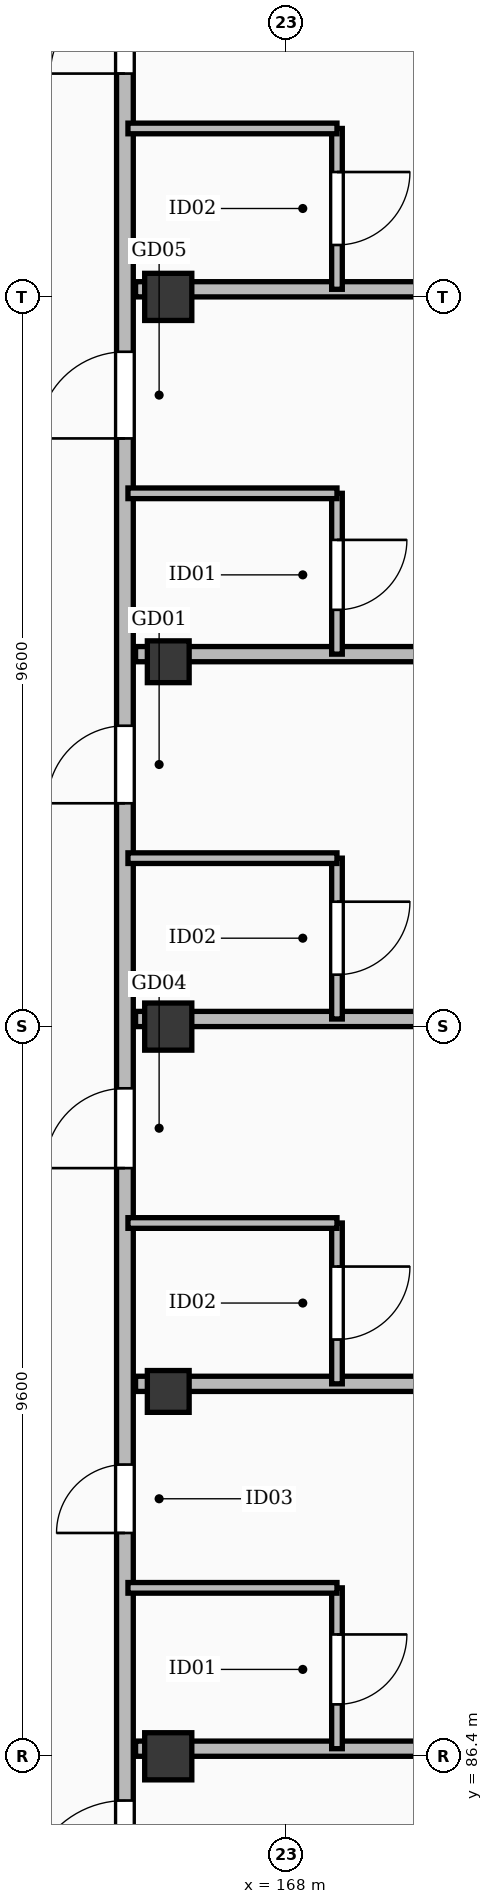
"""IFC4 building model, lengths in metres.
Left out: names, types, materials, properties, quantities, classifications, styles, units other than length and angle.
Written with IfcOpenShell. Run it as: python <this file> out.ifc"""

import sys

from ifc_helpers import new_model, si_unit, direction, frame, frame_2d, origin, origin_2d, place, context, subcontext, project, spatial, rectangle, extrude, element, fill, save


model = new_model("IFC4")
c1 = context("Model", 3, precision=1e-05, world=origin(), true_north=direction((0.0, 1.0)))
c2 = subcontext(c1, "Body", "Model", "MODEL_VIEW")
j1 = project(units=[si_unit("LENGTHUNIT", "METRE"), si_unit("PLANEANGLEUNIT", "RADIAN")], contexts=[c1])
p1 = place(None, origin())
s1 = spatial("IfcSite", under=j1, at=p1, CompositionType="ELEMENT")
p2 = place(p1, origin())
s2 = spatial("IfcBuilding", under=s1, at=p2, CompositionType="ELEMENT")
p3 = place(p2, frame((0.0, 0.0, 42.6)))
s3 = spatial("IfcBuildingStorey", under=s2, at=p3, CompositionType="ELEMENT", Elevation=42.6)
for number, where, z_axis, x_axis in (
    (1, (166.45, 86.4, 0.0), (0.0, 0.0, 1.0), (1.0, 0.0, 0.0)),
    (2, (166.45, 96.0, 0.0), (0.0, 0.0, 1.0), (1.0, 0.0, 0.0)),
    (3, (166.45, 105.6, 0.0), (0.0, 0.0, 1.0), (1.0, 0.0, 0.0)),
):
    element("IfcColumn", number, at=place(p3, frame(where, z_axis=z_axis, x_axis=x_axis)), inside=s3, PredefinedType="COLUMN", context=c2, shape_type="SweptSolid", body=[
        extrude(rectangle(XDim=0.62, YDim=0.62, at=origin_2d()), origin(), (0.0, 0.0, 1.0), 3.9),
    ])
for number, where, z_axis, x_axis in (
    (4, (166.45, 91.2, 0.0), (0.0, 0.0, 1.0), (1.0, 0.0, 0.0)),
    (5, (166.45, 100.8, 0.0), (0.0, 0.0, 1.0), (1.0, 0.0, 0.0)),
):
    element("IfcColumn", number, at=place(p3, frame(where, z_axis=z_axis, x_axis=x_axis)), inside=s3, PredefinedType="COLUMN", context=c2, shape_type="SweptSolid", body=[
        extrude(rectangle(XDim=0.55, YDim=0.55, at=origin_2d()), origin(), (0.0, 0.0, 1.0), 3.9),
    ])
p4 = place(p3, frame((165.88, 62.75, 0.0), z_axis=(0.0, 0.0, 1.0), x_axis=(0.0, 1.0, 0.0)))
e6 = element("IfcWall", 6, at=p4, inside=s3, PredefinedType="PARTITIONING", context=c2, shape_type="SweptSolid", body=[
    extrude(rectangle(XDim=62.9, YDim=0.22, at=frame_2d((31.45, 0.0))), origin(), (0.0, 0.0, 1.0), 2.902),
])
p5 = place(p4, frame((0.691, 0.0, 0.0)))
e7 = element("IfcOpeningElement", 7, at=p5, cuts=e6, PredefinedType="OPENING", context=c2, shape_type="SweptSolid", body=[
    extrude(rectangle(XDim=1.05, YDim=2.22, at=frame_2d((0.525, 1.11))), frame((0.0, 0.122, 0.0), z_axis=(0.0, -1.0, 0.0), x_axis=(1.0, 0.0, 0.0)), (0.0, 0.0, 1.0), 0.244),
])
p6 = place(p4, frame((7.388, 0.0, 0.0)))
e8 = element("IfcOpeningElement", 8, at=p6, cuts=e6, PredefinedType="OPENING", context=c2, shape_type="SweptSolid", body=[
    extrude(rectangle(XDim=1.02, YDim=2.2, at=frame_2d((0.51, 1.1))), frame((0.0, 0.122, 0.0), z_axis=(0.0, -1.0, 0.0), x_axis=(1.0, 0.0, 0.0)), (0.0, 0.0, 1.0), 0.244),
])
p7 = place(p4, frame((12.188, 0.0, 0.0)))
e9 = element("IfcOpeningElement", 9, at=p7, cuts=e6, PredefinedType="OPENING", context=c2, shape_type="SweptSolid", body=[
    extrude(rectangle(XDim=1.14, YDim=2.26, at=frame_2d((0.57, 1.13))), frame((0.0, 0.122, 0.0), z_axis=(0.0, -1.0, 0.0), x_axis=(1.0, 0.0, 0.0)), (0.0, 0.0, 1.0), 0.244),
])
p8 = place(p4, frame((16.988, 0.0, 0.0)))
e10 = element("IfcOpeningElement", 10, at=p8, cuts=e6, PredefinedType="OPENING", context=c2, shape_type="SweptSolid", body=[
    extrude(rectangle(XDim=0.98, YDim=2.15, at=frame_2d((0.49, 1.075))), frame((0.0, 0.122, 0.0), z_axis=(0.0, -1.0, 0.0), x_axis=(1.0, 0.0, 0.0)), (0.0, 0.0, 1.0), 0.244),
])
p9 = place(p4, frame((21.788, 0.0, 0.0)))
e11 = element("IfcOpeningElement", 11, at=p9, cuts=e6, PredefinedType="OPENING", context=c2, shape_type="SweptSolid", body=[
    extrude(rectangle(XDim=1.28, YDim=2.16, at=frame_2d((0.64, 1.08))), frame((0.0, 0.122, 0.0), z_axis=(0.0, -1.0, 0.0), x_axis=(1.0, 0.0, 0.0)), (0.0, 0.0, 1.0), 0.244),
])
p10 = place(p4, frame((26.588, 0.0, 0.0)))
e12 = element("IfcOpeningElement", 12, at=p10, cuts=e6, PredefinedType="OPENING", context=c2, shape_type="SweptSolid", body=[
    extrude(rectangle(XDim=0.9, YDim=2.08, at=frame_2d((0.45, 1.04))), frame((0.0, 0.122, 0.0), z_axis=(0.0, -1.0, 0.0), x_axis=(1.0, 0.0, 0.0)), (0.0, 0.0, 1.0), 0.244),
])
p11 = place(p4, frame((31.388, 0.0, 0.0)))
e13 = element("IfcOpeningElement", 13, at=p11, cuts=e6, PredefinedType="OPENING", context=c2, shape_type="SweptSolid", body=[
    extrude(rectangle(XDim=1.05, YDim=2.22, at=frame_2d((0.525, 1.11))), frame((0.0, 0.122, 0.0), z_axis=(0.0, -1.0, 0.0), x_axis=(1.0, 0.0, 0.0)), (0.0, 0.0, 1.0), 0.244),
])
p12 = place(p4, frame((36.188, 0.0, 0.0)))
e14 = element("IfcOpeningElement", 14, at=p12, cuts=e6, PredefinedType="OPENING", context=c2, shape_type="SweptSolid", body=[
    extrude(rectangle(XDim=1.02, YDim=2.2, at=frame_2d((0.51, 1.1))), frame((0.0, 0.122, 0.0), z_axis=(0.0, -1.0, 0.0), x_axis=(1.0, 0.0, 0.0)), (0.0, 0.0, 1.0), 0.244),
])
p13 = place(p4, frame((40.988, 0.0, 0.0)))
e15 = element("IfcOpeningElement", 15, at=p13, cuts=e6, PredefinedType="OPENING", context=c2, shape_type="SweptSolid", body=[
    extrude(rectangle(XDim=1.14, YDim=2.26, at=frame_2d((0.57, 1.13))), frame((0.0, 0.122, 0.0), z_axis=(0.0, -1.0, 0.0), x_axis=(1.0, 0.0, 0.0)), (0.0, 0.0, 1.0), 0.244),
])
p14 = place(p4, frame((45.788, 0.0, 0.0)))
e16 = element("IfcOpeningElement", 16, at=p14, cuts=e6, PredefinedType="OPENING", context=c2, shape_type="SweptSolid", body=[
    extrude(rectangle(XDim=0.98, YDim=2.15, at=frame_2d((0.49, 1.075))), frame((0.0, 0.122, 0.0), z_axis=(0.0, -1.0, 0.0), x_axis=(1.0, 0.0, 0.0)), (0.0, 0.0, 1.0), 0.244),
])
p15 = place(p4, frame((50.588, 0.0, 0.0)))
e17 = element("IfcOpeningElement", 17, at=p15, cuts=e6, PredefinedType="OPENING", context=c2, shape_type="SweptSolid", body=[
    extrude(rectangle(XDim=1.28, YDim=2.16, at=frame_2d((0.64, 1.08))), frame((0.0, 0.122, 0.0), z_axis=(0.0, -1.0, 0.0), x_axis=(1.0, 0.0, 0.0)), (0.0, 0.0, 1.0), 0.244),
])
p16 = place(p4, frame((55.388, 0.0, 0.0)))
e18 = element("IfcOpeningElement", 18, at=p16, cuts=e6, PredefinedType="OPENING", context=c2, shape_type="SweptSolid", body=[
    extrude(rectangle(XDim=0.9, YDim=2.08, at=frame_2d((0.45, 1.04))), frame((0.0, 0.122, 0.0), z_axis=(0.0, -1.0, 0.0), x_axis=(1.0, 0.0, 0.0)), (0.0, 0.0, 1.0), 0.244),
])
p17 = place(p4, frame((60.188, 0.0, 0.0)))
e19 = element("IfcOpeningElement", 19, at=p17, cuts=e6, PredefinedType="OPENING", context=c2, shape_type="SweptSolid", body=[
    extrude(rectangle(XDim=1.05, YDim=2.22, at=frame_2d((0.525, 1.11))), frame((0.0, 0.122, 0.0), z_axis=(0.0, -1.0, 0.0), x_axis=(1.0, 0.0, 0.0)), (0.0, 0.0, 1.0), 0.244),
])
p18 = place(p3, frame((166.02, 86.5, 0.0), z_axis=(0.0, 0.0, 1.0), x_axis=(1.0, 0.0, 0.0)))
e20 = element("IfcWall", 20, at=p18, inside=s3, PredefinedType="PARTITIONING", context=c2, shape_type="SweptSolid", body=[
    extrude(rectangle(XDim=13.23, YDim=0.2, at=frame_2d((6.615, 0.0))), origin(), (0.0, 0.0, 1.0), 2.902),
])
p19 = place(p3, frame((168.67, 86.5, 0.0), z_axis=(0.0, 0.0, 1.0), x_axis=(0.0, 1.0, 0.0)))
e21 = element("IfcWall", 21, at=p19, inside=s3, PredefinedType="PARTITIONING", context=c2, shape_type="SweptSolid", body=[
    extrude(rectangle(XDim=2.116, YDim=0.14, at=frame_2d((1.058, 0.0))), origin(), (0.0, 0.0, 1.0), 3.072),
])
p20 = place(p19, frame((0.583, 0.0, 0.0)))
e22 = element("IfcOpeningElement", 22, at=p20, cuts=e21, PredefinedType="OPENING", context=c2, shape_type="SweptSolid", body=[
    extrude(rectangle(XDim=0.92, YDim=2.1, at=frame_2d((0.46, 1.05))), frame((0.0, 0.082, 0.0), z_axis=(0.0, -1.0, 0.0), x_axis=(1.0, 0.0, 0.0)), (0.0, 0.0, 1.0), 0.164),
])
p21 = place(p3, frame((165.92, 88.616, 0.0), z_axis=(0.0, 0.0, 1.0), x_axis=(1.0, 0.0, 0.0)))
e23 = element("IfcWall", 23, at=p21, inside=s3, PredefinedType="PARTITIONING", context=c2, shape_type="SweptSolid", body=[
    extrude(rectangle(XDim=2.75, YDim=0.14, at=frame_2d((1.375, 0.0))), origin(), (0.0, 0.0, 1.0), 3.072),
])
p22 = place(p3, frame((166.02, 91.3, 0.0), z_axis=(0.0, 0.0, 1.0), x_axis=(1.0, 0.0, 0.0)))
e24 = element("IfcWall", 24, at=p22, inside=s3, PredefinedType="PARTITIONING", context=c2, shape_type="SweptSolid", body=[
    extrude(rectangle(XDim=13.23, YDim=0.2, at=frame_2d((6.615, 0.0))), origin(), (0.0, 0.0, 1.0), 2.902),
])
p23 = place(p3, frame((168.67, 91.3, 0.0), z_axis=(0.0, 0.0, 1.0), x_axis=(0.0, 1.0, 0.0)))
e25 = element("IfcWall", 25, at=p23, inside=s3, PredefinedType="PARTITIONING", context=c2, shape_type="SweptSolid", body=[
    extrude(rectangle(XDim=2.116, YDim=0.14, at=frame_2d((1.058, 0.0))), origin(), (0.0, 0.0, 1.0), 3.072),
])
p24 = place(p23, frame((0.583, 0.0, 0.0)))
e26 = element("IfcOpeningElement", 26, at=p24, cuts=e25, PredefinedType="OPENING", context=c2, shape_type="SweptSolid", body=[
    extrude(rectangle(XDim=0.96, YDim=2.12, at=frame_2d((0.48, 1.06))), frame((0.0, 0.082, 0.0), z_axis=(0.0, -1.0, 0.0), x_axis=(1.0, 0.0, 0.0)), (0.0, 0.0, 1.0), 0.164),
])
p25 = place(p3, frame((165.92, 93.416, 0.0), z_axis=(0.0, 0.0, 1.0), x_axis=(1.0, 0.0, 0.0)))
e27 = element("IfcWall", 27, at=p25, inside=s3, PredefinedType="PARTITIONING", context=c2, shape_type="SweptSolid", body=[
    extrude(rectangle(XDim=2.75, YDim=0.14, at=frame_2d((1.375, 0.0))), origin(), (0.0, 0.0, 1.0), 3.072),
])
p26 = place(p3, frame((166.02, 96.1, 0.0), z_axis=(0.0, 0.0, 1.0), x_axis=(1.0, 0.0, 0.0)))
e28 = element("IfcWall", 28, at=p26, inside=s3, PredefinedType="PARTITIONING", context=c2, shape_type="SweptSolid", body=[
    extrude(rectangle(XDim=13.23, YDim=0.2, at=frame_2d((6.615, 0.0))), origin(), (0.0, 0.0, 1.0), 2.902),
])
p27 = place(p3, frame((168.67, 96.1, 0.0), z_axis=(0.0, 0.0, 1.0), x_axis=(0.0, 1.0, 0.0)))
e29 = element("IfcWall", 29, at=p27, inside=s3, PredefinedType="PARTITIONING", context=c2, shape_type="SweptSolid", body=[
    extrude(rectangle(XDim=2.116, YDim=0.14, at=frame_2d((1.058, 0.0))), origin(), (0.0, 0.0, 1.0), 3.072),
])
p28 = place(p27, frame((0.583, 0.0, 0.0)))
e30 = element("IfcOpeningElement", 30, at=p28, cuts=e29, PredefinedType="OPENING", context=c2, shape_type="SweptSolid", body=[
    extrude(rectangle(XDim=0.96, YDim=2.12, at=frame_2d((0.48, 1.06))), frame((0.0, 0.082, 0.0), z_axis=(0.0, -1.0, 0.0), x_axis=(1.0, 0.0, 0.0)), (0.0, 0.0, 1.0), 0.164),
])
p29 = place(p3, frame((165.92, 98.216, 0.0), z_axis=(0.0, 0.0, 1.0), x_axis=(1.0, 0.0, 0.0)))
e31 = element("IfcWall", 31, at=p29, inside=s3, PredefinedType="PARTITIONING", context=c2, shape_type="SweptSolid", body=[
    extrude(rectangle(XDim=2.75, YDim=0.14, at=frame_2d((1.375, 0.0))), origin(), (0.0, 0.0, 1.0), 3.072),
])
p30 = place(p3, frame((166.02, 100.9, 0.0), z_axis=(0.0, 0.0, 1.0), x_axis=(1.0, 0.0, 0.0)))
e32 = element("IfcWall", 32, at=p30, inside=s3, PredefinedType="PARTITIONING", context=c2, shape_type="SweptSolid", body=[
    extrude(rectangle(XDim=13.23, YDim=0.2, at=frame_2d((6.615, 0.0))), origin(), (0.0, 0.0, 1.0), 2.902),
])
p31 = place(p3, frame((168.67, 100.9, 0.0), z_axis=(0.0, 0.0, 1.0), x_axis=(0.0, 1.0, 0.0)))
e33 = element("IfcWall", 33, at=p31, inside=s3, PredefinedType="PARTITIONING", context=c2, shape_type="SweptSolid", body=[
    extrude(rectangle(XDim=2.116, YDim=0.14, at=frame_2d((1.058, 0.0))), origin(), (0.0, 0.0, 1.0), 3.072),
])
p32 = place(p31, frame((0.583, 0.0, 0.0)))
e34 = element("IfcOpeningElement", 34, at=p32, cuts=e33, PredefinedType="OPENING", context=c2, shape_type="SweptSolid", body=[
    extrude(rectangle(XDim=0.92, YDim=2.1, at=frame_2d((0.46, 1.05))), frame((0.0, 0.082, 0.0), z_axis=(0.0, -1.0, 0.0), x_axis=(1.0, 0.0, 0.0)), (0.0, 0.0, 1.0), 0.164),
])
p33 = place(p3, frame((165.92, 103.016, 0.0), z_axis=(0.0, 0.0, 1.0), x_axis=(1.0, 0.0, 0.0)))
e35 = element("IfcWall", 35, at=p33, inside=s3, PredefinedType="PARTITIONING", context=c2, shape_type="SweptSolid", body=[
    extrude(rectangle(XDim=2.75, YDim=0.14, at=frame_2d((1.375, 0.0))), origin(), (0.0, 0.0, 1.0), 3.072),
])
p34 = place(p3, frame((166.02, 105.7, 0.0), z_axis=(0.0, 0.0, 1.0), x_axis=(1.0, 0.0, 0.0)))
e36 = element("IfcWall", 36, at=p34, inside=s3, PredefinedType="PARTITIONING", context=c2, shape_type="SweptSolid", body=[
    extrude(rectangle(XDim=13.23, YDim=0.2, at=frame_2d((6.615, 0.0))), origin(), (0.0, 0.0, 1.0), 2.902),
])
p35 = place(p3, frame((168.67, 105.7, 0.0), z_axis=(0.0, 0.0, 1.0), x_axis=(0.0, 1.0, 0.0)))
e37 = element("IfcWall", 37, at=p35, inside=s3, PredefinedType="PARTITIONING", context=c2, shape_type="SweptSolid", body=[
    extrude(rectangle(XDim=2.116, YDim=0.14, at=frame_2d((1.058, 0.0))), origin(), (0.0, 0.0, 1.0), 3.072),
])
p36 = place(p35, frame((0.583, 0.0, 0.0)))
e38 = element("IfcOpeningElement", 38, at=p36, cuts=e37, PredefinedType="OPENING", context=c2, shape_type="SweptSolid", body=[
    extrude(rectangle(XDim=0.96, YDim=2.12, at=frame_2d((0.48, 1.06))), frame((0.0, 0.082, 0.0), z_axis=(0.0, -1.0, 0.0), x_axis=(1.0, 0.0, 0.0)), (0.0, 0.0, 1.0), 0.164),
])
p37 = place(p3, frame((165.92, 107.816, 0.0), z_axis=(0.0, 0.0, 1.0), x_axis=(1.0, 0.0, 0.0)))
e39 = element("IfcWall", 39, at=p37, inside=s3, PredefinedType="PARTITIONING", context=c2, shape_type="SweptSolid", body=[
    extrude(rectangle(XDim=2.75, YDim=0.14, at=frame_2d((1.375, 0.0))), origin(), (0.0, 0.0, 1.0), 3.072),
])
p38 = place(p9, origin())
e40 = element("IfcDoor", 40, at=p38, inside=s3, OperationType="SINGLE_SWING_LEFT", PredefinedType="DOOR", context=c2, shape_type="SweptSolid", body=[
    extrude(rectangle(XDim=1.28, YDim=2.16, at=frame_2d((0.64, 1.08))), frame((0.0, 0.025, 0.0), z_axis=(0.0, -1.0, 0.0), x_axis=(1.0, 0.0, 0.0)), (0.0, 0.0, 1.0), 0.05),
])
fill(e11, e40)
p39 = place(p10, origin())
e41 = element("IfcDoor", 41, at=p39, inside=s3, OperationType="SINGLE_SWING_LEFT", PredefinedType="DOOR", context=c2, shape_type="SweptSolid", body=[
    extrude(rectangle(XDim=0.9, YDim=2.08, at=frame_2d((0.45, 1.04))), frame((0.0, 0.025, 0.0), z_axis=(0.0, -1.0, 0.0), x_axis=(1.0, 0.0, 0.0)), (0.0, 0.0, 1.0), 0.05),
])
fill(e12, e41)
p40 = place(p20, frame((0.92, 0.0, 0.0), z_axis=(0.0, 0.0, 1.0), x_axis=(-1.0, 0.0, 0.0)))
e42 = element("IfcDoor", 42, at=p40, inside=s3, OperationType="SINGLE_SWING_RIGHT", PredefinedType="DOOR", context=c2, shape_type="SweptSolid", body=[
    extrude(rectangle(XDim=0.92, YDim=2.1, at=frame_2d((0.46, 1.05))), frame((0.0, 0.025, 0.0), z_axis=(0.0, -1.0, 0.0), x_axis=(1.0, 0.0, 0.0)), (0.0, 0.0, 1.0), 0.05),
])
fill(e22, e42)
p41 = place(p11, origin())
e43 = element("IfcDoor", 43, at=p41, inside=s3, OperationType="SINGLE_SWING_LEFT", PredefinedType="DOOR", context=c2, shape_type="SweptSolid", body=[
    extrude(rectangle(XDim=1.05, YDim=2.22, at=frame_2d((0.525, 1.11))), frame((0.0, 0.025, 0.0), z_axis=(0.0, -1.0, 0.0), x_axis=(1.0, 0.0, 0.0)), (0.0, 0.0, 1.0), 0.05),
])
fill(e13, e43)
p42 = place(p24, frame((0.96, 0.0, 0.0), z_axis=(0.0, 0.0, 1.0), x_axis=(-1.0, 0.0, 0.0)))
e44 = element("IfcDoor", 44, at=p42, inside=s3, OperationType="SINGLE_SWING_RIGHT", PredefinedType="DOOR", context=c2, shape_type="SweptSolid", body=[
    extrude(rectangle(XDim=0.96, YDim=2.12, at=frame_2d((0.48, 1.06))), frame((0.0, 0.025, 0.0), z_axis=(0.0, -1.0, 0.0), x_axis=(1.0, 0.0, 0.0)), (0.0, 0.0, 1.0), 0.05),
])
fill(e26, e44)
p43 = place(p12, origin())
e45 = element("IfcDoor", 45, at=p43, inside=s3, OperationType="SINGLE_SWING_LEFT", PredefinedType="DOOR", context=c2, shape_type="SweptSolid", body=[
    extrude(rectangle(XDim=1.02, YDim=2.2, at=frame_2d((0.51, 1.1))), frame((0.0, 0.025, 0.0), z_axis=(0.0, -1.0, 0.0), x_axis=(1.0, 0.0, 0.0)), (0.0, 0.0, 1.0), 0.05),
])
fill(e14, e45)
p44 = place(p28, frame((0.96, 0.0, 0.0), z_axis=(0.0, 0.0, 1.0), x_axis=(-1.0, 0.0, 0.0)))
e46 = element("IfcDoor", 46, at=p44, inside=s3, OperationType="SINGLE_SWING_RIGHT", PredefinedType="DOOR", context=c2, shape_type="SweptSolid", body=[
    extrude(rectangle(XDim=0.96, YDim=2.12, at=frame_2d((0.48, 1.06))), frame((0.0, 0.025, 0.0), z_axis=(0.0, -1.0, 0.0), x_axis=(1.0, 0.0, 0.0)), (0.0, 0.0, 1.0), 0.05),
])
fill(e30, e46)
p45 = place(p13, origin())
e47 = element("IfcDoor", 47, at=p45, inside=s3, OperationType="SINGLE_SWING_LEFT", PredefinedType="DOOR", context=c2, shape_type="SweptSolid", body=[
    extrude(rectangle(XDim=1.14, YDim=2.26, at=frame_2d((0.57, 1.13))), frame((0.0, 0.025, 0.0), z_axis=(0.0, -1.0, 0.0), x_axis=(1.0, 0.0, 0.0)), (0.0, 0.0, 1.0), 0.05),
])
fill(e15, e47)
p46 = place(p32, frame((0.92, 0.0, 0.0), z_axis=(0.0, 0.0, 1.0), x_axis=(-1.0, 0.0, 0.0)))
e48 = element("IfcDoor", 48, at=p46, inside=s3, OperationType="SINGLE_SWING_RIGHT", PredefinedType="DOOR", context=c2, shape_type="SweptSolid", body=[
    extrude(rectangle(XDim=0.92, YDim=2.1, at=frame_2d((0.46, 1.05))), frame((0.0, 0.025, 0.0), z_axis=(0.0, -1.0, 0.0), x_axis=(1.0, 0.0, 0.0)), (0.0, 0.0, 1.0), 0.05),
])
fill(e34, e48)
p47 = place(p14, origin())
e49 = element("IfcDoor", 49, at=p47, inside=s3, OperationType="SINGLE_SWING_LEFT", PredefinedType="DOOR", context=c2, shape_type="SweptSolid", body=[
    extrude(rectangle(XDim=0.98, YDim=2.15, at=frame_2d((0.49, 1.075))), frame((0.0, 0.025, 0.0), z_axis=(0.0, -1.0, 0.0), x_axis=(1.0, 0.0, 0.0)), (0.0, 0.0, 1.0), 0.05),
])
fill(e16, e49)
p48 = place(p36, frame((0.96, 0.0, 0.0), z_axis=(0.0, 0.0, 1.0), x_axis=(-1.0, 0.0, 0.0)))
e50 = element("IfcDoor", 50, at=p48, inside=s3, OperationType="SINGLE_SWING_RIGHT", PredefinedType="DOOR", context=c2, shape_type="SweptSolid", body=[
    extrude(rectangle(XDim=0.96, YDim=2.12, at=frame_2d((0.48, 1.06))), frame((0.0, 0.025, 0.0), z_axis=(0.0, -1.0, 0.0), x_axis=(1.0, 0.0, 0.0)), (0.0, 0.0, 1.0), 0.05),
])
fill(e38, e50)
save(model, sys.argv[1])
